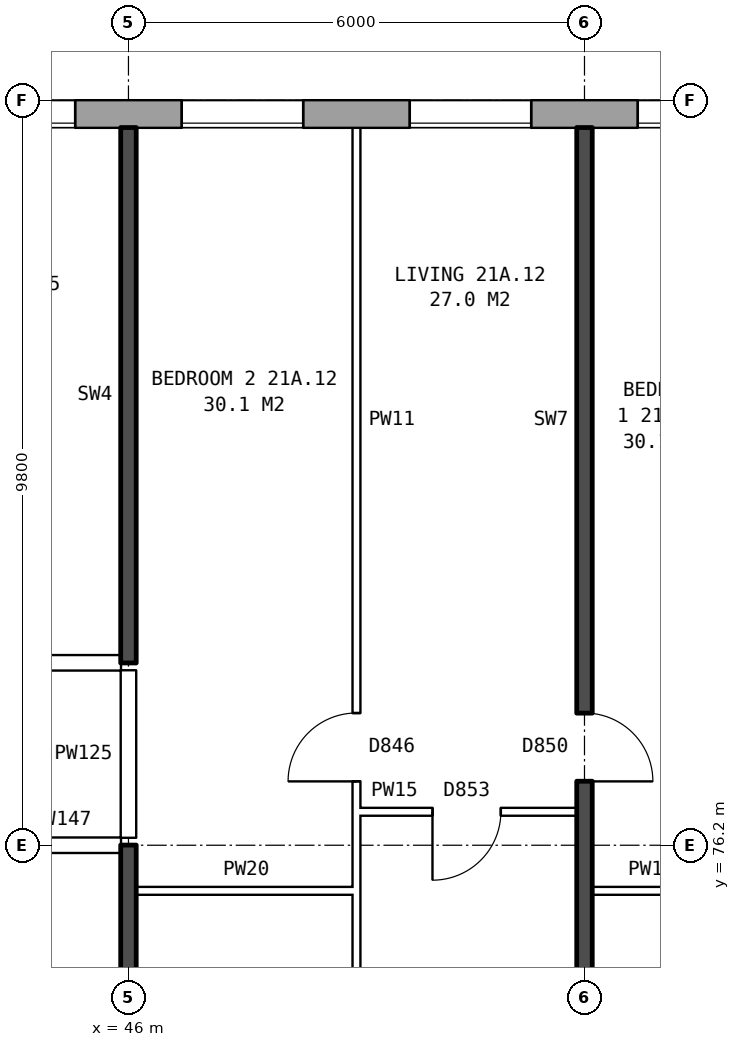
"""IFC4 building model, lengths in metres.
Left out: names, types, materials, properties, quantities, classifications, styles, units other than length and angle.
Written with IfcOpenShell. Run it as: python <this file> out.ifc"""

import sys

from ifc_helpers import new_model, si_unit, direction, frame, frame_2d, origin, place, context, subcontext, project, spatial, rectangle, extrude, element, fill, save


model = new_model("IFC4")
c1 = context("Model", 3, precision=1e-05, world=origin(), true_north=direction((0.0, 1.0)))
c2 = subcontext(c1, "Body", "Model", "MODEL_VIEW")
j1 = project(units=[si_unit("LENGTHUNIT", "METRE"), si_unit("PLANEANGLEUNIT", "RADIAN")], contexts=[c1])
p1 = place(None, origin())
s1 = spatial("IfcSite", under=j1, at=p1, CompositionType="ELEMENT")
p2 = place(p1, origin())
s2 = spatial("IfcBuilding", under=s1, at=p2, CompositionType="ELEMENT")
p3 = place(p2, frame((0.0, 0.0, 77.8)))
s3 = spatial("IfcBuildingStorey", under=s2, at=p3, CompositionType="ELEMENT", Elevation=77.8)
p4 = place(p3, frame((72.925, 85.82, 0.0), z_axis=(0.0, 0.0, 1.0), x_axis=(-1.0, 0.0, 0.0)))
e1 = element("IfcWall", 1, at=p4, inside=s3, PredefinedType="STANDARD", context=c2, shape_type="SweptSolid", body=[
    extrude(rectangle(XDim=46.601, YDim=0.36, at=frame_2d((23.3, 0.0))), origin(), (0.0, 0.0, 1.0), 2.85),
])
p5 = place(p4, frame((0.625, 0.0, 0.8)))
e2 = element("IfcOpeningElement", 2, at=p5, cuts=e1, PredefinedType="OPENING", context=c2, shape_type="SweptSolid", body=[
    extrude(rectangle(XDim=1.6, YDim=1.8, at=frame_2d((0.8, 0.9))), frame((0.0, 0.19, 0.0), z_axis=(0.0, -1.0, 0.0), x_axis=(1.0, 0.0, 0.0)), (0.0, 0.0, 1.0), 0.38),
])
p6 = place(p4, frame((3.625, 0.0, 0.8)))
e3 = element("IfcOpeningElement", 3, at=p6, cuts=e1, PredefinedType="OPENING", context=c2, shape_type="SweptSolid", body=[
    extrude(rectangle(XDim=1.6, YDim=1.8, at=frame_2d((0.8, 0.9))), frame((0.0, 0.19, 0.0), z_axis=(0.0, -1.0, 0.0), x_axis=(1.0, 0.0, 0.0)), (0.0, 0.0, 1.0), 0.38),
])
p7 = place(p4, frame((6.625, 0.0, 0.8)))
e4 = element("IfcOpeningElement", 4, at=p7, cuts=e1, PredefinedType="OPENING", context=c2, shape_type="SweptSolid", body=[
    extrude(rectangle(XDim=1.6, YDim=1.8, at=frame_2d((0.8, 0.9))), frame((0.0, 0.19, 0.0), z_axis=(0.0, -1.0, 0.0), x_axis=(1.0, 0.0, 0.0)), (0.0, 0.0, 1.0), 0.38),
])
p8 = place(p4, frame((9.125, 0.0, 1.65)))
e5 = element("IfcOpeningElement", 5, at=p8, cuts=e1, PredefinedType="OPENING", context=c2, shape_type="SweptSolid", body=[
    extrude(rectangle(XDim=1.4, YDim=0.9, at=frame_2d((0.7, 0.45))), frame((0.0, 0.19, 0.0), z_axis=(0.0, -1.0, 0.0), x_axis=(1.0, 0.0, 0.0)), (0.0, 0.0, 1.0), 0.38),
])
p9 = place(p4, frame((12.625, 0.0, 0.8)))
e6 = element("IfcOpeningElement", 6, at=p9, cuts=e1, PredefinedType="OPENING", context=c2, shape_type="SweptSolid", body=[
    extrude(rectangle(XDim=1.6, YDim=1.8, at=frame_2d((0.8, 0.9))), frame((0.0, 0.19, 0.0), z_axis=(0.0, -1.0, 0.0), x_axis=(1.0, 0.0, 0.0)), (0.0, 0.0, 1.0), 0.38),
])
p10 = place(p4, frame((15.625, 0.0, 0.8)))
e7 = element("IfcOpeningElement", 7, at=p10, cuts=e1, PredefinedType="OPENING", context=c2, shape_type="SweptSolid", body=[
    extrude(rectangle(XDim=1.6, YDim=1.8, at=frame_2d((0.8, 0.9))), frame((0.0, 0.19, 0.0), z_axis=(0.0, -1.0, 0.0), x_axis=(1.0, 0.0, 0.0)), (0.0, 0.0, 1.0), 0.38),
])
p11 = place(p4, frame((18.625, 0.0, 0.8)))
e8 = element("IfcOpeningElement", 8, at=p11, cuts=e1, PredefinedType="OPENING", context=c2, shape_type="SweptSolid", body=[
    extrude(rectangle(XDim=1.6, YDim=1.8, at=frame_2d((0.8, 0.9))), frame((0.0, 0.19, 0.0), z_axis=(0.0, -1.0, 0.0), x_axis=(1.0, 0.0, 0.0)), (0.0, 0.0, 1.0), 0.38),
])
p12 = place(p4, frame((21.625, 0.0, 0.8)))
e9 = element("IfcOpeningElement", 9, at=p12, cuts=e1, PredefinedType="OPENING", context=c2, shape_type="SweptSolid", body=[
    extrude(rectangle(XDim=1.6, YDim=1.8, at=frame_2d((0.8, 0.9))), frame((0.0, 0.19, 0.0), z_axis=(0.0, -1.0, 0.0), x_axis=(1.0, 0.0, 0.0)), (0.0, 0.0, 1.0), 0.38),
])
p13 = place(p4, frame((24.625, 0.0, 0.8)))
e10 = element("IfcOpeningElement", 10, at=p13, cuts=e1, PredefinedType="OPENING", context=c2, shape_type="SweptSolid", body=[
    extrude(rectangle(XDim=1.6, YDim=1.8, at=frame_2d((0.8, 0.9))), frame((0.0, 0.19, 0.0), z_axis=(0.0, -1.0, 0.0), x_axis=(1.0, 0.0, 0.0)), (0.0, 0.0, 1.0), 0.38),
])
p14 = place(p4, frame((27.625, 0.0, 0.8)))
e11 = element("IfcOpeningElement", 11, at=p14, cuts=e1, PredefinedType="OPENING", context=c2, shape_type="SweptSolid", body=[
    extrude(rectangle(XDim=1.6, YDim=1.8, at=frame_2d((0.8, 0.9))), frame((0.0, 0.19, 0.0), z_axis=(0.0, -1.0, 0.0), x_axis=(1.0, 0.0, 0.0)), (0.0, 0.0, 1.0), 0.38),
])
p15 = place(p4, frame((30.625, 0.0, 0.8)))
e12 = element("IfcOpeningElement", 12, at=p15, cuts=e1, PredefinedType="OPENING", context=c2, shape_type="SweptSolid", body=[
    extrude(rectangle(XDim=1.6, YDim=1.8, at=frame_2d((0.8, 0.9))), frame((0.0, 0.19, 0.0), z_axis=(0.0, -1.0, 0.0), x_axis=(1.0, 0.0, 0.0)), (0.0, 0.0, 1.0), 0.38),
])
p16 = place(p4, frame((33.125, 0.0, 0.75)))
e13 = element("IfcOpeningElement", 13, at=p16, cuts=e1, PredefinedType="OPENING", context=c2, shape_type="SweptSolid", body=[
    extrude(rectangle(XDim=0.6, YDim=1.8, at=frame_2d((0.3, 0.9))), frame((0.0, 0.19, 0.0), z_axis=(0.0, -1.0, 0.0), x_axis=(1.0, 0.0, 0.0)), (0.0, 0.0, 1.0), 0.38),
])
p17 = place(p4, frame((36.125, 0.0, 1.6)))
e14 = element("IfcOpeningElement", 14, at=p17, cuts=e1, PredefinedType="OPENING", context=c2, shape_type="SweptSolid", body=[
    extrude(rectangle(XDim=0.6, YDim=0.9, at=frame_2d((0.3, 0.45))), frame((0.0, 0.19, 0.0), z_axis=(0.0, -1.0, 0.0), x_axis=(1.0, 0.0, 0.0)), (0.0, 0.0, 1.0), 0.38),
])
p18 = place(p4, frame((39.625, 0.0, 0.8)))
e15 = element("IfcOpeningElement", 15, at=p18, cuts=e1, PredefinedType="OPENING", context=c2, shape_type="SweptSolid", body=[
    extrude(rectangle(XDim=1.6, YDim=1.8, at=frame_2d((0.8, 0.9))), frame((0.0, 0.19, 0.0), z_axis=(0.0, -1.0, 0.0), x_axis=(1.0, 0.0, 0.0)), (0.0, 0.0, 1.0), 0.38),
])
p19 = place(p4, frame((42.625, 0.0, 0.8)))
e16 = element("IfcOpeningElement", 16, at=p19, cuts=e1, PredefinedType="OPENING", context=c2, shape_type="SweptSolid", body=[
    extrude(rectangle(XDim=1.6, YDim=1.8, at=frame_2d((0.8, 0.9))), frame((0.0, 0.19, 0.0), z_axis=(0.0, -1.0, 0.0), x_axis=(1.0, 0.0, 0.0)), (0.0, 0.0, 1.0), 0.38),
])
p20 = place(p4, frame((11.125, 0.0, 0.15)))
e17 = element("IfcOpeningElement", 17, at=p20, cuts=e1, PredefinedType="OPENING", context=c2, shape_type="SweptSolid", body=[
    extrude(rectangle(XDim=0.6, YDim=0.9, at=frame_2d((0.3, 0.45))), frame((0.0, 0.19, 0.0), z_axis=(0.0, -1.0, 0.0), x_axis=(1.0, 0.0, 0.0)), (0.0, 0.0, 1.0), 0.38),
])
p21 = place(p4, frame((34.025, 0.0, 0.65)))
e18 = element("IfcOpeningElement", 18, at=p21, cuts=e1, PredefinedType="OPENING", context=c2, shape_type="SweptSolid", body=[
    extrude(rectangle(XDim=0.8, YDim=0.9, at=frame_2d((0.4, 0.45))), frame((0.0, 0.19, 0.0), z_axis=(0.0, -1.0, 0.0), x_axis=(1.0, 0.0, 0.0)), (0.0, 0.0, 1.0), 0.38),
])
p22 = place(p4, frame((37.025, 0.0, 0.8)))
e19 = element("IfcOpeningElement", 19, at=p22, cuts=e1, PredefinedType="OPENING", context=c2, shape_type="SweptSolid", body=[
    extrude(rectangle(XDim=1.6, YDim=1.8, at=frame_2d((0.8, 0.9))), frame((0.0, 0.19, 0.0), z_axis=(0.0, -1.0, 0.0), x_axis=(1.0, 0.0, 0.0)), (0.0, 0.0, 1.0), 0.38),
])
p23 = place(p3, frame((46.1, 75.6, 0.0), z_axis=(0.0, 0.0, 1.0), x_axis=(1.0, 0.0, 0.0)))
e20 = element("IfcWall", 20, at=p23, inside=s3, PredefinedType="PARTITIONING", context=c2, shape_type="SweptSolid", body=[
    extrude(rectangle(XDim=2.9, YDim=0.1, at=frame_2d((1.45, 0.0))), origin(), (0.0, 0.0, 1.0), 2.85),
])
p24 = place(p3, frame((52.1, 75.6, 0.0), z_axis=(0.0, 0.0, 1.0), x_axis=(1.0, 0.0, 0.0)))
e21 = element("IfcWall", 21, at=p24, inside=s3, PredefinedType="PARTITIONING", context=c2, shape_type="SweptSolid", body=[
    extrude(rectangle(XDim=2.8, YDim=0.1, at=frame_2d((1.4, 0.0))), origin(), (0.0, 0.0, 1.0), 2.85),
])
p25 = place(p3, frame((44.36, 76.2, 0.0), z_axis=(0.0, 0.0, 1.0), x_axis=(1.0, 0.0, 0.0)))
e22 = element("IfcWall", 22, at=p25, inside=s3, PredefinedType="PARTITIONING", context=c2, shape_type="SweptSolid", body=[
    extrude(rectangle(XDim=1.54, YDim=0.2, at=frame_2d((0.77, 0.0))), origin(), (0.0, 0.0, 1.0), 2.85),
])
p26 = place(p3, frame((49.0, 76.64, 0.0), z_axis=(0.0, 0.0, 1.0), x_axis=(1.0, 0.0, 0.0)))
e23 = element("IfcWall", 23, at=p26, inside=s3, PredefinedType="PARTITIONING", context=c2, shape_type="SweptSolid", body=[
    extrude(rectangle(XDim=2.9, YDim=0.1, at=frame_2d((1.45, 0.0))), origin(), (0.0, 0.0, 1.0), 2.85),
])
p27 = place(p26, frame((1.0, 0.0, 0.0)))
e24 = element("IfcOpeningElement", 24, at=p27, cuts=e23, PredefinedType="OPENING", context=c2, shape_type="SweptSolid", body=[
    extrude(rectangle(XDim=0.9, YDim=2.1, at=frame_2d((0.45, 1.05))), frame((0.0, 0.06, 0.0), z_axis=(0.0, -1.0, 0.0), x_axis=(1.0, 0.0, 0.0)), (0.0, 0.0, 1.0), 0.12),
])
p28 = place(p3, frame((23.61, 78.6, 0.0), z_axis=(0.0, 0.0, 1.0), x_axis=(1.0, 0.0, 0.0)))
e25 = element("IfcWall", 25, at=p28, inside=s3, PredefinedType="PARTITIONING", context=c2, shape_type="SweptSolid", body=[
    extrude(rectangle(XDim=22.29, YDim=0.2, at=frame_2d((11.145, 0.0))), origin(), (0.0, 0.0, 1.0), 2.85),
])
p29 = place(p28, frame((18.84, 0.0, 0.0)))
e26 = element("IfcOpeningElement", 26, at=p29, cuts=e25, PredefinedType="OPENING", context=c2, shape_type="SweptSolid", body=[
    extrude(rectangle(XDim=1.0, YDim=2.1, at=frame_2d((0.5, 1.05))), frame((0.0, 0.11, 0.0), z_axis=(0.0, -1.0, 0.0), x_axis=(1.0, 0.0, 0.0)), (0.0, 0.0, 1.0), 0.22),
])
p30 = place(p28, frame((6.89, 0.0, 0.0)))
e27 = element("IfcOpeningElement", 27, at=p30, cuts=e25, PredefinedType="OPENING", context=c2, shape_type="SweptSolid", body=[
    extrude(rectangle(XDim=1.0, YDim=2.1, at=frame_2d((0.5, 1.05))), frame((0.0, 0.11, 0.0), z_axis=(0.0, -1.0, 0.0), x_axis=(1.0, 0.0, 0.0)), (0.0, 0.0, 1.0), 0.22),
])
p31 = place(p3, frame((46.0, 71.2, 0.0), z_axis=(0.0, 0.0, 1.0), x_axis=(0.0, 1.0, 0.0)))
e28 = element("IfcWall", 28, at=p31, inside=s3, PredefinedType="SOLIDWALL", context=c2, shape_type="SweptSolid", body=[
    extrude(rectangle(XDim=5.0, YDim=0.2, at=frame_2d((2.5, 0.0))), origin(), (0.0, 0.0, 1.0), 2.85),
])
p32 = place(p3, frame((46.0, 76.3, 0.0), z_axis=(0.0, 0.0, 1.0), x_axis=(0.0, 1.0, 0.0)))
e29 = element("IfcWall", 29, at=p32, inside=s3, PredefinedType="PARTITIONING", context=c2, shape_type="SweptSolid", body=[
    extrude(rectangle(XDim=2.2, YDim=0.2, at=frame_2d((1.1, 0.0))), origin(), (0.0, 0.0, 1.0), 2.85),
])
p33 = place(p3, frame((46.0, 78.6, 0.0), z_axis=(0.0, 0.0, 1.0), x_axis=(0.0, 1.0, 0.0)))
e30 = element("IfcWall", 30, at=p33, inside=s3, PredefinedType="SOLIDWALL", context=c2, shape_type="SweptSolid", body=[
    extrude(rectangle(XDim=7.04, YDim=0.2, at=frame_2d((3.52, 0.0))), origin(), (0.0, 0.0, 1.0), 2.85),
])
p34 = place(p3, frame((49.0, 71.3, 0.0), z_axis=(0.0, 0.0, 1.0), x_axis=(0.0, 1.0, 0.0)))
e31 = element("IfcWall", 31, at=p34, inside=s3, PredefinedType="PARTITIONING", context=c2, shape_type="SweptSolid", body=[
    extrude(rectangle(XDim=14.34, YDim=0.1, at=frame_2d((7.17, 0.0))), origin(), (0.0, 0.0, 1.0), 2.85),
])
p35 = place(p34, frame((5.74, 0.0, 0.0)))
e32 = element("IfcOpeningElement", 32, at=p35, cuts=e31, PredefinedType="OPENING", context=c2, shape_type="SweptSolid", body=[
    extrude(rectangle(XDim=0.9, YDim=2.1, at=frame_2d((0.45, 1.05))), frame((0.0, 0.06, 0.0), z_axis=(0.0, -1.0, 0.0), x_axis=(1.0, 0.0, 0.0)), (0.0, 0.0, 1.0), 0.12),
])
p36 = place(p34, frame((0.4, 0.0, 0.0)))
e33 = element("IfcOpeningElement", 33, at=p36, cuts=e31, PredefinedType="OPENING", context=c2, shape_type="SweptSolid", body=[
    extrude(rectangle(XDim=0.9, YDim=2.1, at=frame_2d((0.45, 1.05))), frame((0.0, 0.06, 0.0), z_axis=(0.0, -1.0, 0.0), x_axis=(1.0, 0.0, 0.0)), (0.0, 0.0, 1.0), 0.12),
])
p37 = place(p3, frame((52.0, 71.2, 0.0), z_axis=(0.0, 0.0, 1.0), x_axis=(0.0, 1.0, 0.0)))
e34 = element("IfcWall", 34, at=p37, inside=s3, PredefinedType="SOLIDWALL", context=c2, shape_type="SweptSolid", body=[
    extrude(rectangle(XDim=14.44, YDim=0.2, at=frame_2d((7.22, 0.0))), origin(), (0.0, 0.0, 1.0), 2.85),
])
p38 = place(p37, frame((5.84, 0.0, 0.0)))
e35 = element("IfcOpeningElement", 35, at=p38, cuts=e34, PredefinedType="OPENING", context=c2, shape_type="SweptSolid", body=[
    extrude(rectangle(XDim=0.9, YDim=2.1, at=frame_2d((0.45, 1.05))), frame((0.0, 0.11, 0.0), z_axis=(0.0, -1.0, 0.0), x_axis=(1.0, 0.0, 0.0)), (0.0, 0.0, 1.0), 0.22),
])
p39 = place(p37, frame((0.4, 0.0, 0.0)))
e36 = element("IfcOpeningElement", 36, at=p39, cuts=e34, PredefinedType="OPENING", context=c2, shape_type="SweptSolid", body=[
    extrude(rectangle(XDim=0.9, YDim=2.1, at=frame_2d((0.45, 1.05))), frame((0.0, 0.11, 0.0), z_axis=(0.0, -1.0, 0.0), x_axis=(1.0, 0.0, 0.0)), (0.0, 0.0, 1.0), 0.22),
])
p40 = place(p11, origin())
e37 = element("IfcWindow", 37, at=p40, inside=s3, PartitioningType="SINGLE_PANEL", PredefinedType="WINDOW", context=c2, shape_type="SweptSolid", body=[
    extrude(rectangle(XDim=1.6, YDim=1.8, at=frame_2d((0.8, 0.9))), frame((0.0, 0.15, 0.0), z_axis=(0.0, -1.0, 0.0), x_axis=(1.0, 0.0, 0.0)), (0.0, 0.0, 1.0), 0.06),
])
fill(e8, e37)
p41 = place(p12, origin())
e38 = element("IfcWindow", 38, at=p41, inside=s3, PartitioningType="SINGLE_PANEL", PredefinedType="WINDOW", context=c2, shape_type="SweptSolid", body=[
    extrude(rectangle(XDim=1.6, YDim=1.8, at=frame_2d((0.8, 0.9))), frame((0.0, 0.15, 0.0), z_axis=(0.0, -1.0, 0.0), x_axis=(1.0, 0.0, 0.0)), (0.0, 0.0, 1.0), 0.06),
])
fill(e9, e38)
p42 = place(p13, origin())
e39 = element("IfcWindow", 39, at=p42, inside=s3, PartitioningType="SINGLE_PANEL", PredefinedType="WINDOW", context=c2, shape_type="SweptSolid", body=[
    extrude(rectangle(XDim=1.6, YDim=1.8, at=frame_2d((0.8, 0.9))), frame((0.0, 0.15, 0.0), z_axis=(0.0, -1.0, 0.0), x_axis=(1.0, 0.0, 0.0)), (0.0, 0.0, 1.0), 0.06),
])
fill(e10, e39)
p43 = place(p14, origin())
e40 = element("IfcWindow", 40, at=p43, inside=s3, PartitioningType="SINGLE_PANEL", PredefinedType="WINDOW", context=c2, shape_type="SweptSolid", body=[
    extrude(rectangle(XDim=1.6, YDim=1.8, at=frame_2d((0.8, 0.9))), frame((0.0, 0.15, 0.0), z_axis=(0.0, -1.0, 0.0), x_axis=(1.0, 0.0, 0.0)), (0.0, 0.0, 1.0), 0.06),
])
fill(e11, e40)
p44 = place(p38, frame((0.9, 0.0, 0.0), z_axis=(0.0, 0.0, 1.0), x_axis=(-1.0, 0.0, 0.0)))
e41 = element("IfcDoor", 41, at=p44, inside=s3, OperationType="SINGLE_SWING_RIGHT", PredefinedType="DOOR", context=c2, shape_type="SweptSolid", body=[
    extrude(rectangle(XDim=0.9, YDim=2.1, at=frame_2d((0.45, 1.05))), frame((0.0, 0.025, 0.0), z_axis=(0.0, -1.0, 0.0), x_axis=(1.0, 0.0, 0.0)), (0.0, 0.0, 1.0), 0.05),
])
fill(e35, e41)
p45 = place(p35, origin())
e42 = element("IfcDoor", 42, at=p45, inside=s3, OperationType="SINGLE_SWING_LEFT", PredefinedType="DOOR", context=c2, shape_type="SweptSolid", body=[
    extrude(rectangle(XDim=0.9, YDim=2.1, at=frame_2d((0.45, 1.05))), frame((0.0, 0.025, 0.0), z_axis=(0.0, -1.0, 0.0), x_axis=(1.0, 0.0, 0.0)), (0.0, 0.0, 1.0), 0.05),
])
fill(e32, e42)
p46 = place(p27, frame((0.9, 0.0, 0.0), z_axis=(0.0, 0.0, 1.0), x_axis=(-1.0, 0.0, 0.0)))
e43 = element("IfcDoor", 43, at=p46, inside=s3, OperationType="SINGLE_SWING_RIGHT", PredefinedType="DOOR", context=c2, shape_type="SweptSolid", body=[
    extrude(rectangle(XDim=0.9, YDim=2.1, at=frame_2d((0.45, 1.05))), frame((0.0, 0.025, 0.0), z_axis=(0.0, -1.0, 0.0), x_axis=(1.0, 0.0, 0.0)), (0.0, 0.0, 1.0), 0.05),
])
fill(e24, e43)
save(model, sys.argv[1])
